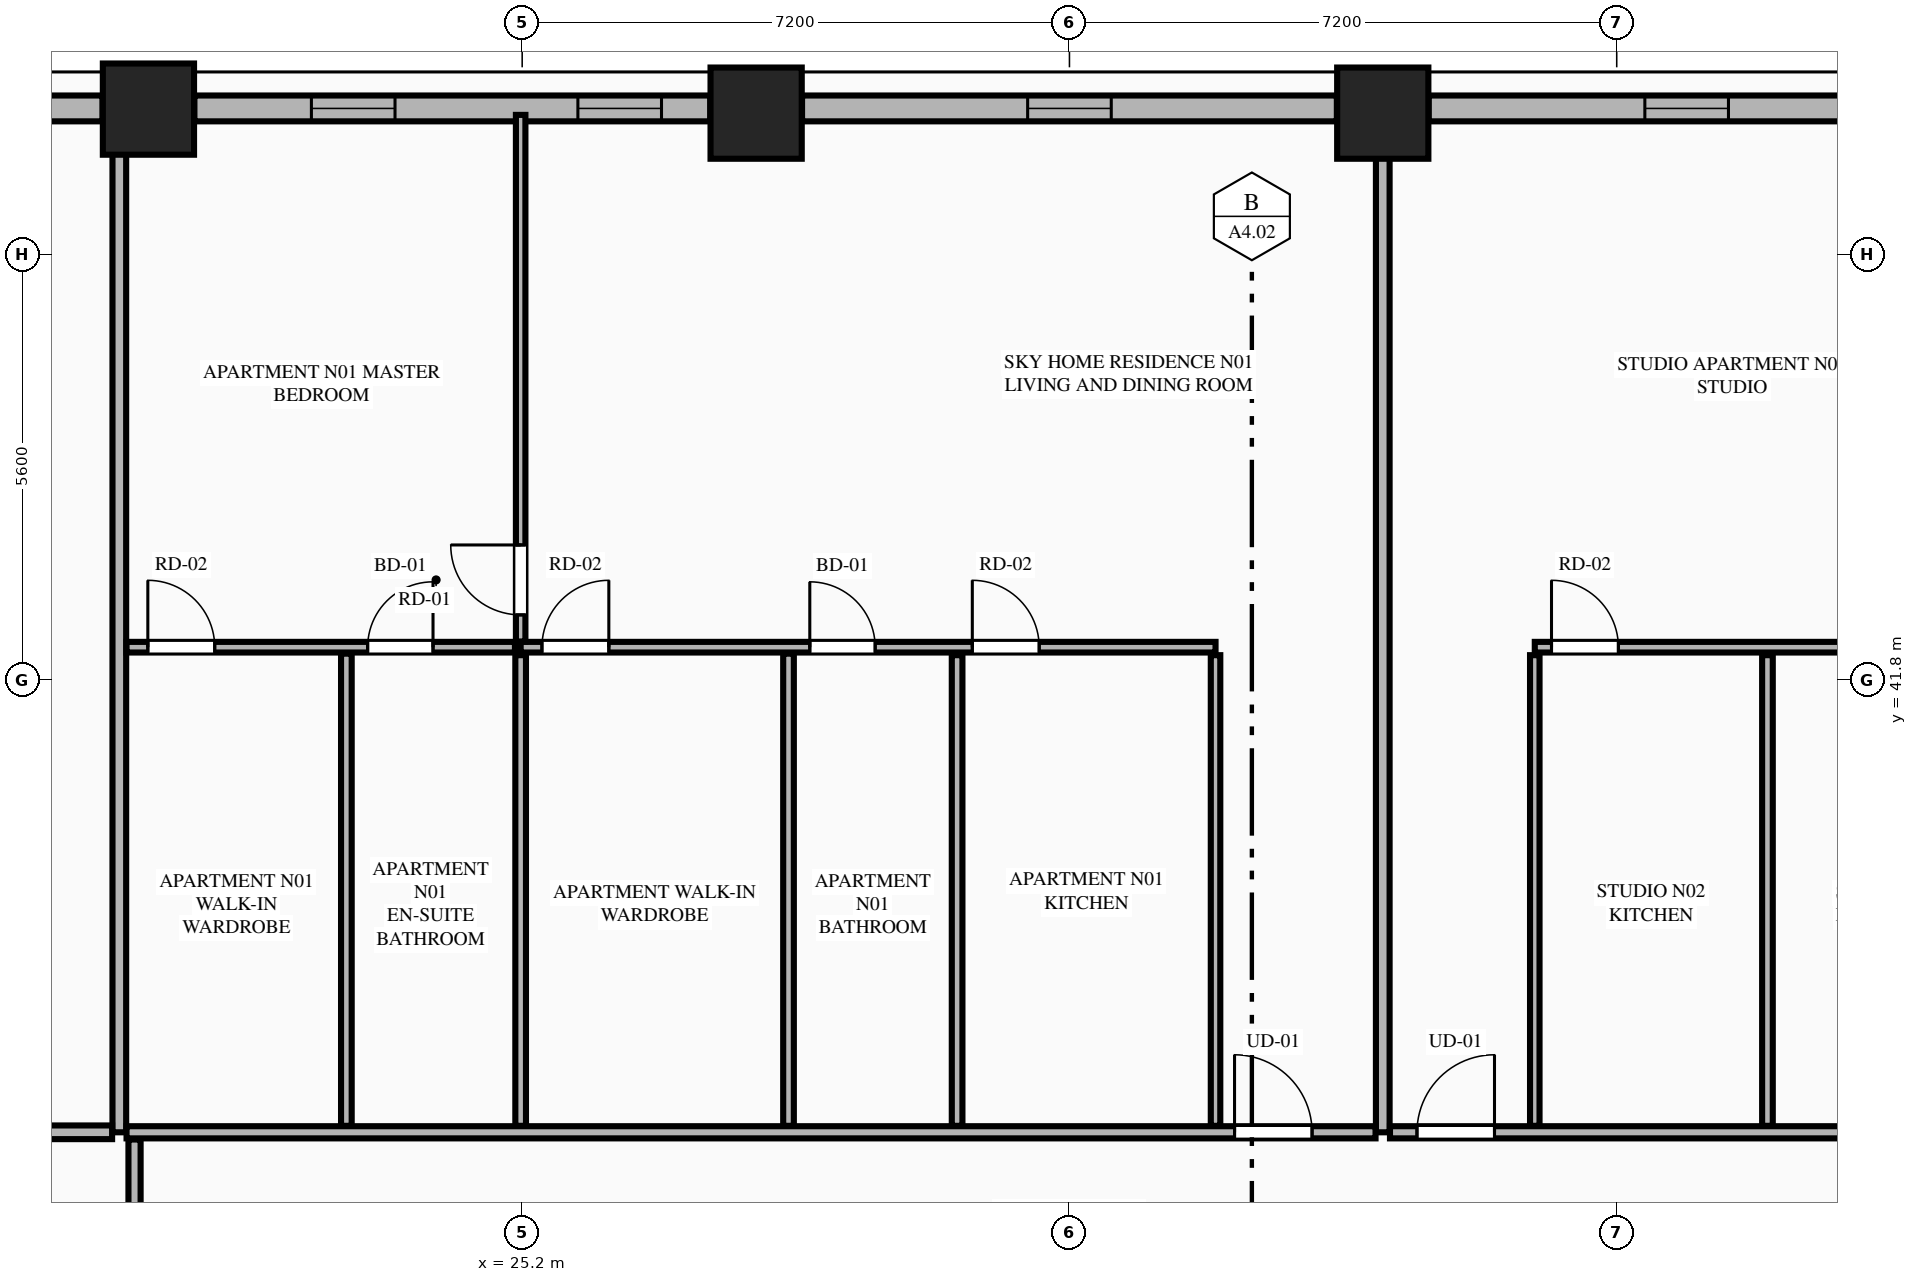
"""IFC4 building model, lengths in metres.
Left out: names, types, materials, properties, quantities, classifications, styles, units other than length and angle.
Written with IfcOpenShell. Run it as: python <this file> out.ifc"""

import sys

from ifc_helpers import new_model, si_unit, direction, frame, frame_2d, origin, origin_2d, place, context, subcontext, project, spatial, rectangle, extrude, element, fill, save


model = new_model("IFC4")
c1 = context("Model", 3, precision=1e-05, world=origin(), true_north=direction((0.0, 1.0)))
c2 = subcontext(c1, "Body", "Model", "MODEL_VIEW")
j1 = project(units=[si_unit("LENGTHUNIT", "METRE"), si_unit("PLANEANGLEUNIT", "RADIAN")], contexts=[c1])
p1 = place(None, origin())
s1 = spatial("IfcSite", under=j1, at=p1, CompositionType="ELEMENT")
p2 = place(p1, origin())
s2 = spatial("IfcBuilding", under=s1, at=p2, CompositionType="ELEMENT")
p3 = place(p2, frame((0.0, 0.0, 35.55)))
s3 = spatial("IfcBuildingStorey", under=s2, at=p3, CompositionType="ELEMENT", Elevation=35.55)
for number, where, z_axis, x_axis in (
    (1, (36.522, 49.258, 0.0), (0.0, 0.0, 1.0), (1.0, 0.0, 0.0)),
    (2, (28.278, 49.258, 0.0), (0.0, 0.0, 1.0), (1.0, 0.0, 0.0)),
    (3, (20.283, 49.311, 0.0), (0.0, 0.0, 1.0), (1.0, 0.0, 0.0)),
):
    element("IfcColumn", number, at=place(p3, frame(where, z_axis=z_axis, x_axis=x_axis)), inside=s3, PredefinedType="COLUMN", context=c2, shape_type="SweptSolid", body=[
        extrude(rectangle(XDim=1.2, YDim=1.2, at=origin_2d()), origin(), (0.0, 0.0, 1.0), 3.55),
    ])
p4 = place(p3, frame((43.913, 49.32, 0.0), z_axis=(0.0, 0.0, 1.0), x_axis=(-1.0, 0.0, 0.0)))
e4 = element("IfcWall", 4, at=p4, inside=s3, PredefinedType="STANDARD", context=c2, shape_type="SweptSolid", body=[
    extrude(rectangle(XDim=6.787, YDim=0.34, at=frame_2d((3.394, 0.0))), origin(), (0.0, 0.0, 1.0), 2.787),
])
p5 = place(p4, frame((2.843, 0.0, 0.75)))
e5 = element("IfcOpeningElement", 5, at=p5, cuts=e4, PredefinedType="OPENING", context=c2, shape_type="SweptSolid", body=[
    extrude(rectangle(XDim=1.1, YDim=1.887, at=frame_2d((0.55, 0.943))), frame((0.0, 0.18, 0.0), z_axis=(0.0, -1.0, 0.0), x_axis=(1.0, 0.0, 0.0)), (0.0, 0.0, 1.0), 0.36),
])
p6 = place(p3, frame((35.918, 49.32, 0.0), z_axis=(0.0, 0.0, 1.0), x_axis=(-1.0, 0.0, 0.0)))
e6 = element("IfcWall", 6, at=p6, inside=s3, PredefinedType="STANDARD", context=c2, shape_type="SweptSolid", body=[
    extrude(rectangle(XDim=7.036, YDim=0.34, at=frame_2d((3.518, 0.0))), origin(), (0.0, 0.0, 1.0), 2.787),
])
p7 = place(p6, frame((2.968, 0.0, 0.75)))
e7 = element("IfcOpeningElement", 7, at=p7, cuts=e6, PredefinedType="OPENING", context=c2, shape_type="SweptSolid", body=[
    extrude(rectangle(XDim=1.1, YDim=1.887, at=frame_2d((0.55, 0.943))), frame((0.0, 0.18, 0.0), z_axis=(0.0, -1.0, 0.0), x_axis=(1.0, 0.0, 0.0)), (0.0, 0.0, 1.0), 0.36),
])
p8 = place(p3, frame((27.674, 49.32, 0.0), z_axis=(0.0, 0.0, 1.0), x_axis=(-1.0, 0.0, 0.0)))
e8 = element("IfcWall", 8, at=p8, inside=s3, PredefinedType="STANDARD", context=c2, shape_type="SweptSolid", body=[
    extrude(rectangle(XDim=6.787, YDim=0.34, at=frame_2d((3.394, 0.0))), origin(), (0.0, 0.0, 1.0), 2.787),
])
p9 = place(p8, frame((0.641, 0.0, 0.75)))
e9 = element("IfcOpeningElement", 9, at=p9, cuts=e8, PredefinedType="OPENING", context=c2, shape_type="SweptSolid", body=[
    extrude(rectangle(XDim=1.1, YDim=1.887, at=frame_2d((0.55, 0.943))), frame((0.0, 0.18, 0.0), z_axis=(0.0, -1.0, 0.0), x_axis=(1.0, 0.0, 0.0)), (0.0, 0.0, 1.0), 0.36),
])
p10 = place(p8, frame((4.147, 0.0, 0.75)))
e10 = element("IfcOpeningElement", 10, at=p10, cuts=e8, PredefinedType="OPENING", context=c2, shape_type="SweptSolid", body=[
    extrude(rectangle(XDim=1.1, YDim=1.887, at=frame_2d((0.55, 0.943))), frame((0.0, 0.18, 0.0), z_axis=(0.0, -1.0, 0.0), x_axis=(1.0, 0.0, 0.0)), (0.0, 0.0, 1.0), 0.36),
])
p11 = place(p3, frame((19.679, 49.32, 0.0), z_axis=(0.0, 0.0, 1.0), x_axis=(-1.0, 0.0, 0.0)))
e11 = element("IfcWall", 11, at=p11, inside=s3, PredefinedType="STANDARD", context=c2, shape_type="SweptSolid", body=[
    extrude(rectangle(XDim=1.245, YDim=0.34, at=frame_2d((0.623, 0.0))), origin(), (0.0, 0.0, 1.0), 3.33),
])
p12 = place(p3, frame((19.9, 35.85, 0.0), z_axis=(0.0, 0.0, 1.0), x_axis=(0.0, 1.0, 0.0)))
e12 = element("IfcWall", 12, at=p12, inside=s3, PredefinedType="PARTITIONING", context=c2, shape_type="SweptSolid", body=[
    extrude(rectangle(XDim=13.295, YDim=0.18, at=frame_2d((6.647, 0.0))), origin(), (0.0, 0.0, 1.0), 3.33),
])
p13 = place(p3, frame((36.522, 35.85, 0.0), z_axis=(0.0, 0.0, 1.0), x_axis=(0.0, 1.0, 0.0)))
e13 = element("IfcWall", 13, at=p13, inside=s3, PredefinedType="PARTITIONING", context=c2, shape_type="SweptSolid", body=[
    extrude(rectangle(XDim=13.295, YDim=0.18, at=frame_2d((6.647, 0.0))), origin(), (0.0, 0.0, 1.0), 2.7),
])
p14 = place(p3, frame((19.995, 35.85, 0.0), z_axis=(0.0, 0.0, 1.0), x_axis=(1.0, 0.0, 0.0)))
e14 = element("IfcWall", 14, at=p14, inside=s3, PredefinedType="PARTITIONING", context=c2, shape_type="SweptSolid", body=[
    extrude(rectangle(XDim=16.432, YDim=0.16, at=frame_2d((8.216, 0.0))), origin(), (0.0, 0.0, 1.0), 3.33),
])
p15 = place(p14, frame((14.577, 0.0, 0.0)))
e15 = element("IfcOpeningElement", 15, at=p15, cuts=e14, PredefinedType="OPENING", context=c2, shape_type="SweptSolid", body=[
    extrude(rectangle(XDim=1.02, YDim=2.25, at=frame_2d((0.51, 1.125))), frame((0.0, 0.09, 0.0), z_axis=(0.0, -1.0, 0.0), x_axis=(1.0, 0.0, 0.0)), (0.0, 0.0, 1.0), 0.18),
])
p16 = place(p3, frame((34.322, 35.935, 0.0), z_axis=(0.0, 0.0, 1.0), x_axis=(0.0, 1.0, 0.0)))
e16 = element("IfcWall", 16, at=p16, inside=s3, PredefinedType="PARTITIONING", context=c2, shape_type="SweptSolid", body=[
    extrude(rectangle(XDim=6.192, YDim=0.125, at=frame_2d((3.096, 0.0))), origin(), (0.0, 0.0, 1.0), 3.33),
])
p17 = place(p3, frame((25.18, 42.232, 0.0), z_axis=(0.0, 0.0, 1.0), x_axis=(1.0, 0.0, 0.0)))
e17 = element("IfcWall", 17, at=p17, inside=s3, PredefinedType="PLUMBINGWALL", context=c2, shape_type="SweptSolid", body=[
    extrude(rectangle(XDim=9.142, YDim=0.14, at=frame_2d((4.571, 0.0))), origin(), (0.0, 0.0, 1.0), 3.33),
])
p18 = place(p17, frame((0.28, 0.0, 0.0)))
e18 = element("IfcOpeningElement", 18, at=p18, cuts=e17, PredefinedType="OPENING", context=c2, shape_type="SweptSolid", body=[
    extrude(rectangle(XDim=0.88, YDim=2.15, at=frame_2d((0.44, 1.075))), frame((0.0, 0.08, 0.0), z_axis=(0.0, -1.0, 0.0), x_axis=(1.0, 0.0, 0.0)), (0.0, 0.0, 1.0), 0.16),
])
p19 = place(p17, frame((3.804, 0.0, 0.0)))
e19 = element("IfcOpeningElement", 19, at=p19, cuts=e17, PredefinedType="OPENING", context=c2, shape_type="SweptSolid", body=[
    extrude(rectangle(XDim=0.86, YDim=2.1, at=frame_2d((0.43, 1.05))), frame((0.0, 0.08, 0.0), z_axis=(0.0, -1.0, 0.0), x_axis=(1.0, 0.0, 0.0)), (0.0, 0.0, 1.0), 0.16),
])
p20 = place(p17, frame((5.942, 0.0, 0.0)))
e20 = element("IfcOpeningElement", 20, at=p20, cuts=e17, PredefinedType="OPENING", context=c2, shape_type="SweptSolid", body=[
    extrude(rectangle(XDim=0.88, YDim=2.15, at=frame_2d((0.44, 1.075))), frame((0.0, 0.08, 0.0), z_axis=(0.0, -1.0, 0.0), x_axis=(1.0, 0.0, 0.0)), (0.0, 0.0, 1.0), 0.16),
])
p21 = place(p3, frame((19.995, 42.232, 0.0), z_axis=(0.0, 0.0, 1.0), x_axis=(1.0, 0.0, 0.0)))
e21 = element("IfcWall", 21, at=p21, inside=s3, PredefinedType="PLUMBINGWALL", context=c2, shape_type="SweptSolid", body=[
    extrude(rectangle(XDim=5.11, YDim=0.14, at=frame_2d((2.555, 0.0))), origin(), (0.0, 0.0, 1.0), 3.33),
])
p22 = place(p21, frame((0.28, 0.0, 0.0)))
e22 = element("IfcOpeningElement", 22, at=p22, cuts=e21, PredefinedType="OPENING", context=c2, shape_type="SweptSolid", body=[
    extrude(rectangle(XDim=0.88, YDim=2.15, at=frame_2d((0.44, 1.075))), frame((0.0, 0.08, 0.0), z_axis=(0.0, -1.0, 0.0), x_axis=(1.0, 0.0, 0.0)), (0.0, 0.0, 1.0), 0.16),
])
p23 = place(p21, frame((3.172, 0.0, 0.0)))
e23 = element("IfcOpeningElement", 23, at=p23, cuts=e21, PredefinedType="OPENING", context=c2, shape_type="SweptSolid", body=[
    extrude(rectangle(XDim=0.86, YDim=2.1, at=frame_2d((0.43, 1.05))), frame((0.0, 0.08, 0.0), z_axis=(0.0, -1.0, 0.0), x_axis=(1.0, 0.0, 0.0)), (0.0, 0.0, 1.0), 0.16),
])
for number, where, z_axis, x_axis in (
    (24, (30.922, 35.935, 0.0), (0.0, 0.0, 1.0), (0.0, 1.0, 0.0)),
    (25, (25.18, 35.935, 0.0), (0.0, 0.0, 1.0), (0.0, 1.0, 0.0)),
):
    element("IfcWall", number, at=place(p3, frame(where, z_axis=z_axis, x_axis=x_axis)), inside=s3, PredefinedType="PLUMBINGWALL", context=c2, shape_type="SweptSolid", body=[
        extrude(rectangle(XDim=6.192, YDim=0.14, at=frame_2d((3.096, 0.0))), origin(), (0.0, 0.0, 1.0), 3.33),
    ])
p24 = place(p3, frame((25.18, 42.307, 0.0), z_axis=(0.0, 0.0, 1.0), x_axis=(0.0, 1.0, 0.0)))
e26 = element("IfcWall", 26, at=p24, inside=s3, PredefinedType="PARTITIONING", context=c2, shape_type="SweptSolid", body=[
    extrude(rectangle(XDim=6.928, YDim=0.125, at=frame_2d((3.464, 0.0))), origin(), (0.0, 0.0, 1.0), 3.33),
])
p25 = place(p24, frame((0.35, 0.0, 0.0)))
e27 = element("IfcOpeningElement", 27, at=p25, cuts=e26, PredefinedType="OPENING", context=c2, shape_type="SweptSolid", body=[
    extrude(rectangle(XDim=0.92, YDim=2.15, at=frame_2d((0.46, 1.075))), frame((0.0, 0.073, 0.0), z_axis=(0.0, -1.0, 0.0), x_axis=(1.0, 0.0, 0.0)), (0.0, 0.0, 1.0), 0.145),
])
p26 = place(p3, frame((28.704, 35.935, 0.0), z_axis=(0.0, 0.0, 1.0), x_axis=(0.0, 1.0, 0.0)))
e28 = element("IfcWall", 28, at=p26, inside=s3, PredefinedType="PLUMBINGWALL", context=c2, shape_type="SweptSolid", body=[
    extrude(rectangle(XDim=6.212, YDim=0.14, at=frame_2d((3.106, 0.0))), origin(), (0.0, 0.0, 1.0), 3.33),
])
p27 = place(p3, frame((22.887, 35.935, 0.0), z_axis=(0.0, 0.0, 1.0), x_axis=(0.0, 1.0, 0.0)))
e29 = element("IfcWall", 29, at=p27, inside=s3, PredefinedType="PLUMBINGWALL", context=c2, shape_type="SweptSolid", body=[
    extrude(rectangle(XDim=6.212, YDim=0.14, at=frame_2d((3.106, 0.0))), origin(), (0.0, 0.0, 1.0), 2.7),
])
p28 = place(p3, frame((36.617, 35.85, 0.0), z_axis=(0.0, 0.0, 1.0), x_axis=(1.0, 0.0, 0.0)))
e30 = element("IfcWall", 30, at=p28, inside=s3, PredefinedType="PARTITIONING", context=c2, shape_type="SweptSolid", body=[
    extrude(rectangle(XDim=8.188, YDim=0.16, at=frame_2d((4.094, 0.0))), origin(), (0.0, 0.0, 1.0), 3.33),
])
p29 = place(p28, frame((0.355, 0.0, 0.0)))
e31 = element("IfcOpeningElement", 31, at=p29, cuts=e30, PredefinedType="OPENING", context=c2, shape_type="SweptSolid", body=[
    extrude(rectangle(XDim=1.02, YDim=2.25, at=frame_2d((0.51, 1.125))), frame((0.0, 0.09, 0.0), z_axis=(0.0, -1.0, 0.0), x_axis=(1.0, 0.0, 0.0)), (0.0, 0.0, 1.0), 0.18),
])
p30 = place(p3, frame((38.522, 35.935, 0.0), z_axis=(0.0, 0.0, 1.0), x_axis=(0.0, 1.0, 0.0)))
e32 = element("IfcWall", 32, at=p30, inside=s3, PredefinedType="PARTITIONING", context=c2, shape_type="SweptSolid", body=[
    extrude(rectangle(XDim=6.192, YDim=0.125, at=frame_2d((3.096, 0.0))), origin(), (0.0, 0.0, 1.0), 3.33),
])
p31 = place(p3, frame((38.522, 42.232, 0.0), z_axis=(0.0, 0.0, 1.0), x_axis=(1.0, 0.0, 0.0)))
e33 = element("IfcWall", 33, at=p31, inside=s3, PredefinedType="PLUMBINGWALL", context=c2, shape_type="SweptSolid", body=[
    extrude(rectangle(XDim=6.283, YDim=0.14, at=frame_2d((3.142, 0.0))), origin(), (0.0, 0.0, 1.0), 3.33),
])
p32 = place(p31, frame((4.247, 0.0, 0.0)))
e34 = element("IfcOpeningElement", 34, at=p32, cuts=e33, PredefinedType="OPENING", context=c2, shape_type="SweptSolid", body=[
    extrude(rectangle(XDim=0.86, YDim=2.1, at=frame_2d((0.43, 1.05))), frame((0.0, 0.08, 0.0), z_axis=(0.0, -1.0, 0.0), x_axis=(1.0, 0.0, 0.0)), (0.0, 0.0, 1.0), 0.16),
])
p33 = place(p31, frame((0.22, 0.0, 0.0)))
e35 = element("IfcOpeningElement", 35, at=p33, cuts=e33, PredefinedType="OPENING", context=c2, shape_type="SweptSolid", body=[
    extrude(rectangle(XDim=0.88, YDim=2.15, at=frame_2d((0.44, 1.075))), frame((0.0, 0.08, 0.0), z_axis=(0.0, -1.0, 0.0), x_axis=(1.0, 0.0, 0.0)), (0.0, 0.0, 1.0), 0.16),
])
p34 = place(p3, frame((41.583, 35.935, 0.0), z_axis=(0.0, 0.0, 1.0), x_axis=(0.0, 1.0, 0.0)))
e36 = element("IfcWall", 36, at=p34, inside=s3, PredefinedType="PLUMBINGWALL", context=c2, shape_type="SweptSolid", body=[
    extrude(rectangle(XDim=6.192, YDim=0.14, at=frame_2d((3.096, 0.0))), origin(), (0.0, 0.0, 1.0), 3.33),
])
p35 = place(p3, frame((10.665, 35.85, 0.0), z_axis=(0.0, 0.0, 1.0), x_axis=(1.0, 0.0, 0.0)))
e37 = element("IfcWall", 37, at=p35, inside=s3, PredefinedType="PARTITIONING", context=c2, shape_type="SweptSolid", body=[
    extrude(rectangle(XDim=9.14, YDim=0.18, at=frame_2d((4.57, 0.0))), origin(), (0.0, 0.0, 1.0), 3.33),
])
p36 = place(p3, frame((20.1, 25.995, 0.0), z_axis=(0.0, 0.0, 1.0), x_axis=(0.0, 1.0, 0.0)))
e38 = element("IfcWall", 38, at=p36, inside=s3, PredefinedType="PARTITIONING", context=c2, shape_type="SweptSolid", body=[
    extrude(rectangle(XDim=9.76, YDim=0.16, at=frame_2d((4.88, 0.0))), origin(), (0.0, 0.0, 1.0), 2.7),
])
p37 = place(p36, frame((0.45, 0.0, 0.0)))
e39 = element("IfcOpeningElement", 39, at=p37, cuts=e38, PredefinedType="OPENING", context=c2, shape_type="SweptSolid", body=[
    extrude(rectangle(XDim=1.02, YDim=2.25, at=frame_2d((0.51, 1.125))), frame((0.0, 0.09, 0.0), z_axis=(0.0, -1.0, 0.0), x_axis=(1.0, 0.0, 0.0)), (0.0, 0.0, 1.0), 0.18),
])
p38 = place(p5, origin())
e40 = element("IfcWindow", 40, at=p38, inside=s3, PartitioningType="SINGLE_PANEL", PredefinedType="WINDOW", context=c2, shape_type="SweptSolid", body=[
    extrude(rectangle(XDim=1.1, YDim=1.887, at=frame_2d((0.55, 0.943))), frame((0.0, 0.03, 0.0), z_axis=(0.0, -1.0, 0.0), x_axis=(1.0, 0.0, 0.0)), (0.0, 0.0, 1.0), 0.06),
])
fill(e5, e40)
p39 = place(p7, origin())
e41 = element("IfcWindow", 41, at=p39, inside=s3, PartitioningType="SINGLE_PANEL", PredefinedType="WINDOW", context=c2, shape_type="SweptSolid", body=[
    extrude(rectangle(XDim=1.1, YDim=1.887, at=frame_2d((0.55, 0.943))), frame((0.0, 0.03, 0.0), z_axis=(0.0, -1.0, 0.0), x_axis=(1.0, 0.0, 0.0)), (0.0, 0.0, 1.0), 0.06),
])
fill(e7, e41)
p40 = place(p9, origin())
e42 = element("IfcWindow", 42, at=p40, inside=s3, PartitioningType="SINGLE_PANEL", PredefinedType="WINDOW", context=c2, shape_type="SweptSolid", body=[
    extrude(rectangle(XDim=1.1, YDim=1.887, at=frame_2d((0.55, 0.943))), frame((0.0, 0.03, 0.0), z_axis=(0.0, -1.0, 0.0), x_axis=(1.0, 0.0, 0.0)), (0.0, 0.0, 1.0), 0.06),
])
fill(e9, e42)
p41 = place(p18, origin())
e43 = element("IfcDoor", 43, at=p41, inside=s3, OperationType="SINGLE_SWING_RIGHT", PredefinedType="DOOR", context=c2, shape_type="SweptSolid", body=[
    extrude(rectangle(XDim=0.88, YDim=2.15, at=frame_2d((0.44, 1.075))), frame((0.0, 0.025, 0.0), z_axis=(0.0, -1.0, 0.0), x_axis=(1.0, 0.0, 0.0)), (0.0, 0.0, 1.0), 0.05),
])
fill(e18, e43)
p42 = place(p19, origin())
e44 = element("IfcDoor", 44, at=p42, inside=s3, OperationType="SINGLE_SWING_LEFT", PredefinedType="DOOR", context=c2, shape_type="SweptSolid", body=[
    extrude(rectangle(XDim=0.86, YDim=2.1, at=frame_2d((0.43, 1.05))), frame((0.0, 0.025, 0.0), z_axis=(0.0, -1.0, 0.0), x_axis=(1.0, 0.0, 0.0)), (0.0, 0.0, 1.0), 0.05),
])
fill(e19, e44)
p43 = place(p22, origin())
e45 = element("IfcDoor", 45, at=p43, inside=s3, OperationType="SINGLE_SWING_LEFT", PredefinedType="DOOR", context=c2, shape_type="SweptSolid", body=[
    extrude(rectangle(XDim=0.88, YDim=2.15, at=frame_2d((0.44, 1.075))), frame((0.0, 0.025, 0.0), z_axis=(0.0, -1.0, 0.0), x_axis=(1.0, 0.0, 0.0)), (0.0, 0.0, 1.0), 0.05),
])
fill(e22, e45)
p44 = place(p23, origin())
e46 = element("IfcDoor", 46, at=p44, inside=s3, OperationType="SINGLE_SWING_RIGHT", PredefinedType="DOOR", context=c2, shape_type="SweptSolid", body=[
    extrude(rectangle(XDim=0.86, YDim=2.1, at=frame_2d((0.43, 1.05))), frame((0.0, 0.025, 0.0), z_axis=(0.0, -1.0, 0.0), x_axis=(1.0, 0.0, 0.0)), (0.0, 0.0, 1.0), 0.05),
])
fill(e23, e46)
p45 = place(p15, origin())
e47 = element("IfcDoor", 47, at=p45, inside=s3, OperationType="SINGLE_SWING_LEFT", PredefinedType="DOOR", context=c2, shape_type="SweptSolid", body=[
    extrude(rectangle(XDim=1.02, YDim=2.25, at=frame_2d((0.51, 1.125))), frame((0.0, 0.025, 0.0), z_axis=(0.0, -1.0, 0.0), x_axis=(1.0, 0.0, 0.0)), (0.0, 0.0, 1.0), 0.05),
])
fill(e15, e47)
p46 = place(p20, origin())
e48 = element("IfcDoor", 48, at=p46, inside=s3, OperationType="SINGLE_SWING_LEFT", PredefinedType="DOOR", context=c2, shape_type="SweptSolid", body=[
    extrude(rectangle(XDim=0.88, YDim=2.15, at=frame_2d((0.44, 1.075))), frame((0.0, 0.025, 0.0), z_axis=(0.0, -1.0, 0.0), x_axis=(1.0, 0.0, 0.0)), (0.0, 0.0, 1.0), 0.05),
])
fill(e20, e48)
p47 = place(p25, origin())
e49 = element("IfcDoor", 49, at=p47, inside=s3, OperationType="SINGLE_SWING_RIGHT", PredefinedType="DOOR", context=c2, shape_type="SweptSolid", body=[
    extrude(rectangle(XDim=0.92, YDim=2.15, at=frame_2d((0.46, 1.075))), frame((0.0, 0.025, 0.0), z_axis=(0.0, -1.0, 0.0), x_axis=(1.0, 0.0, 0.0)), (0.0, 0.0, 1.0), 0.05),
])
fill(e27, e49)
p48 = place(p29, origin())
e50 = element("IfcDoor", 50, at=p48, inside=s3, OperationType="SINGLE_SWING_RIGHT", PredefinedType="DOOR", context=c2, shape_type="SweptSolid", body=[
    extrude(rectangle(XDim=1.02, YDim=2.25, at=frame_2d((0.51, 1.125))), frame((0.0, 0.025, 0.0), z_axis=(0.0, -1.0, 0.0), x_axis=(1.0, 0.0, 0.0)), (0.0, 0.0, 1.0), 0.05),
])
fill(e31, e50)
p49 = place(p33, origin())
e51 = element("IfcDoor", 51, at=p49, inside=s3, OperationType="SINGLE_SWING_LEFT", PredefinedType="DOOR", context=c2, shape_type="SweptSolid", body=[
    extrude(rectangle(XDim=0.88, YDim=2.15, at=frame_2d((0.44, 1.075))), frame((0.0, 0.025, 0.0), z_axis=(0.0, -1.0, 0.0), x_axis=(1.0, 0.0, 0.0)), (0.0, 0.0, 1.0), 0.05),
])
fill(e35, e51)
p50 = place(p10, origin())
e52 = element("IfcWindow", 52, at=p50, inside=s3, PartitioningType="SINGLE_PANEL", PredefinedType="WINDOW", context=c2, shape_type="SweptSolid", body=[
    extrude(rectangle(XDim=1.1, YDim=1.887, at=frame_2d((0.55, 0.943))), frame((0.0, 0.03, 0.0), z_axis=(0.0, -1.0, 0.0), x_axis=(1.0, 0.0, 0.0)), (0.0, 0.0, 1.0), 0.06),
])
fill(e10, e52)
save(model, sys.argv[1])
